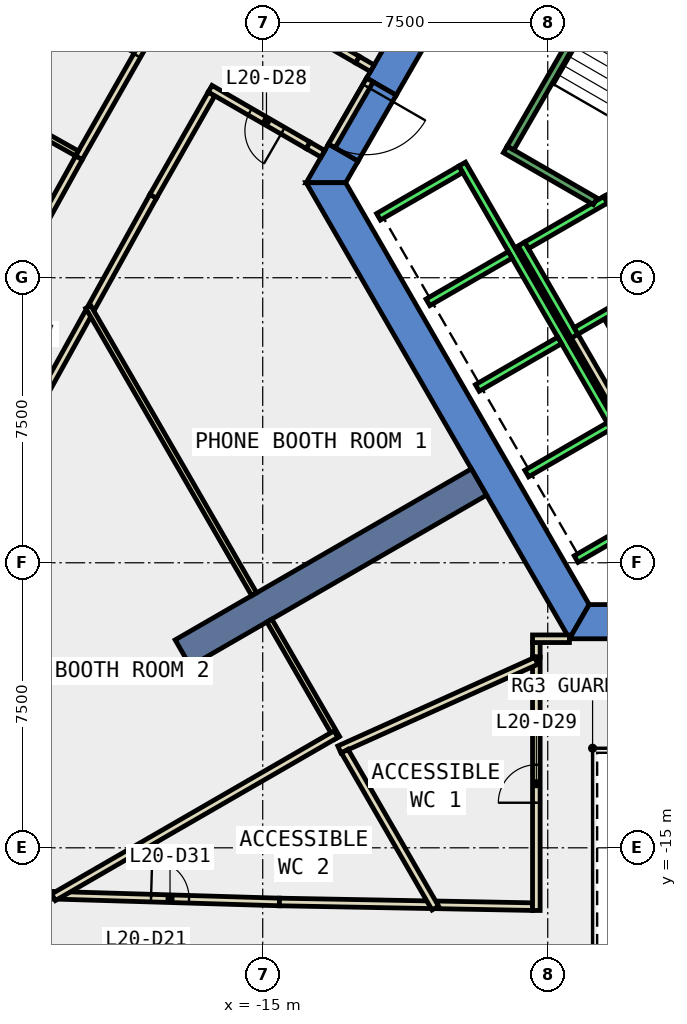
"""IFC4 building model, lengths in metres.
Left out: names, types, materials, properties, quantities, classifications, styles, units other than length and angle.
Written with IfcOpenShell. Run it as: python <this file> out.ifc"""

import sys

from ifc_helpers import new_model, si_unit, direction, frame, frame_2d, origin, place, context, subcontext, project, spatial, polyline, rectangle, outline, extrude, element, fill, save


model = new_model("IFC4")
c1 = context("Model", 3, precision=1e-05, world=origin(), true_north=direction((0.0, 1.0)))
c2 = subcontext(c1, "Body", "Model", "MODEL_VIEW")
j1 = project(units=[si_unit("LENGTHUNIT", "METRE"), si_unit("PLANEANGLEUNIT", "RADIAN")], contexts=[c1])
p1 = place(None, origin())
s1 = spatial("IfcSite", under=j1, at=p1, CompositionType="ELEMENT")
p2 = place(p1, origin())
s2 = spatial("IfcBuilding", under=s1, at=p2, CompositionType="ELEMENT")
p3 = place(p2, frame((0.0, 0.0, 95.0)))
s3 = spatial("IfcBuildingStorey", under=s2, at=p3, CompositionType="ELEMENT", Elevation=95.0)
p4 = place(p3, frame((0.0, 0.0, -0.4)))
e1 = element("IfcWall", 1, at=p4, inside=s3, PredefinedType="SHEAR", context=c2, shape_type="SweptSolid", body=[
    extrude(outline(polyline([(-12.267, 5.252), (-11.488, 4.802), (-6.409, 13.6), (-6.928, 14.5), (-12.267, 5.252)])), origin(), (0.0, 0.0, 1.0), 4.2),
])
p5 = place(p3, frame((0.0, 0.0, -0.4)))
e2 = element("IfcWall", 2, at=p5, inside=s3, PredefinedType="SHEAR", context=c2, shape_type="SweptSolid", body=[
    extrude(outline(polyline([(-12.488, 3.07), (-13.267, 3.52), (-13.856, 2.5), (-12.817, 2.5), (-12.488, 3.07)])), origin(), (0.0, 0.0, 1.0), 4.2),
])
p6 = place(p3, frame((0.0, 0.0, 3.6)))
e3 = element("IfcWall", 3, at=p6, inside=s3, PredefinedType="SHEAR", context=c2, shape_type="SweptSolid", body=[
    extrude(outline(polyline([(-13.267, 3.52), (-12.488, 3.07), (-11.488, 4.802), (-12.267, 5.252), (-13.267, 3.52)])), origin(), (0.0, 0.0, 1.0), 0.2),
])
p7 = place(p3, frame((0.0, 0.0, -0.4)))
e4 = element("IfcWall", 4, at=p7, inside=s3, PredefinedType="SHEAR", context=c2, shape_type="SweptSolid", body=[
    extrude(outline(polyline([(-13.856, 2.5), (-6.928, -9.5), (-6.409, -8.6), (-12.817, 2.5), (-13.856, 2.5)])), origin(), (0.0, 0.0, 1.0), 4.2),
])
p8 = place(p3, frame((0.0, 0.0, -0.4)))
e5 = element("IfcWall", 5, at=p8, inside=s3, PredefinedType="SHEAR", context=c2, shape_type="SweptSolid", body=[
    extrude(outline(polyline([(3.75, -9.5), (3.75, -8.6), (-6.409, -8.6), (-6.928, -9.5), (3.75, -9.5)])), origin(), (0.0, 0.0, 1.0), 4.2),
])
p9 = place(p3, frame((-9.31, -5.375, -0.4), z_axis=(0.0, 0.0, 1.0), x_axis=(-0.866017533419, -0.500013631625, 0.0)))
e6 = element("IfcWall", 6, at=p9, inside=s3, PredefinedType="SHEAR", context=c2, shape_type="SweptSolid", body=[
    extrude(rectangle(XDim=9.0, YDim=0.8, at=frame_2d((4.5, 0.0))), origin(), (0.0, 0.0, 1.0), 4.2),
])
p10 = place(p3, frame((-15.098, 7.233, 0.0), z_axis=(0.0, 0.0, 1.0), x_axis=(0.866101363304, -0.499868411168, 0.0)))
e7 = element("IfcWall", 7, at=p10, inside=s3, PredefinedType="PARTITIONING", context=c2, shape_type="SweptSolid", body=[
    extrude(rectangle(XDim=2.992, YDim=0.2, at=frame_2d((1.496, 0.0))), origin(), (0.0, 0.0, 1.0), 3.8),
])
p11 = place(p3, frame((-17.883, 2.143, 0.0), z_axis=(0.0, 0.0, 1.0), x_axis=(-0.484695523805, -0.874682942101, 0.0)))
e8 = element("IfcWall", 8, at=p11, inside=s3, PredefinedType="PARTITIONING", context=c2, shape_type="SweptSolid", body=[
    extrude(rectangle(XDim=3.349, YDim=0.2, at=frame_2d((1.674, 0.0))), origin(), (0.0, 0.0, 1.0), 3.8),
])
p12 = place(p3, frame((-13.417, 3.26, 0.0), z_axis=(0.0, 0.0, 1.0), x_axis=(-0.866032067792, 0.499988457423, 0.0)))
e9 = element("IfcWall", 9, at=p12, inside=s3, PredefinedType="PARTITIONING", context=c2, shape_type="SweptSolid", body=[
    extrude(rectangle(XDim=0.45, YDim=0.2, at=frame_2d((0.225, 0.0))), origin(), (0.0, 0.0, 1.0), 2.4),
])
p13 = place(p3, frame((-16.348, 4.837, 0.0), z_axis=(0.0, 0.0, 1.0), x_axis=(-0.495121026513, -0.868824015037, 0.0)))
e10 = element("IfcWall", 10, at=p13, inside=s3, PredefinedType="PARTITIONING", context=c2, shape_type="SweptSolid", body=[
    extrude(rectangle(XDim=3.101, YDim=0.2, at=frame_2d((1.55, 0.0))), origin(), (0.0, 0.0, 1.0), 3.8),
])
p14 = place(p3, frame((-10.408, -16.501, 0.0), z_axis=(0.0, 0.0, 1.0), x_axis=(0.999823568917, -0.018783797216, 0.0)))
e11 = element("IfcWall", 11, at=p14, inside=s3, PredefinedType="PARTITIONING", context=c2, shape_type="SweptSolid", body=[
    extrude(rectangle(XDim=2.509, YDim=0.2, at=frame_2d((1.254, 0.0))), origin(), (0.0, 0.0, 1.0), 3.8),
])
p15 = place(p3, frame((-19.579, -0.917, 0.0), z_axis=(0.0, 0.0, 1.0), x_axis=(-0.484700239797, -0.874680328772, 0.0)))
e12 = element("IfcWall", 12, at=p15, inside=s3, PredefinedType="PARTITIONING", context=c2, shape_type="SweptSolid", body=[
    extrude(rectangle(XDim=3.585, YDim=0.2, at=frame_2d((1.792, 0.0))), origin(), (0.0, 0.0, 1.0), 3.8),
])
p16 = place(p3, frame((-21.446, -16.22, 0.0), z_axis=(0.0, 0.0, 1.0), x_axis=(0.999542625536, -0.030241358047, 0.0)))
e13 = element("IfcWall", 13, at=p16, inside=s3, PredefinedType="PARTITIONING", context=c2, shape_type="SweptSolid", body=[
    extrude(rectangle(XDim=0.928, YDim=0.2, at=frame_2d((0.464, 0.0))), origin(), (0.0, 0.0, 1.0), 3.8),
])
p17 = place(p3, frame((-20.318, -16.253, 0.0), z_axis=(0.0, 0.0, 1.0), x_axis=(0.999553385537, -0.029883598524, 0.0)))
e14 = element("IfcWall", 14, at=p17, inside=s3, PredefinedType="PARTITIONING", context=c2, shape_type="SweptSolid", body=[
    extrude(rectangle(XDim=5.76, YDim=0.2, at=frame_2d((2.88, 0.0))), origin(), (0.0, 0.0, 1.0), 3.8),
])
p18 = place(p17, frame((2.38, 0.0, 0.0)))
e15 = element("IfcOpeningElement", 15, at=p18, cuts=e14, PredefinedType="OPENING", context=c2, shape_type="SweptSolid", body=[
    extrude(rectangle(XDim=1.0, YDim=2.1, at=frame_2d((0.5, 1.05))), frame((0.0, 0.11, 0.0), z_axis=(0.0, -1.0, 0.0), x_axis=(1.0, 0.0, 0.0)), (0.0, 0.0, 1.0), 0.22),
])
p19 = place(p3, frame((-14.561, -16.425, 0.0), z_axis=(0.0, 0.0, 1.0), x_axis=(0.999829548691, -0.018462761553, 0.0)))
e16 = element("IfcWall", 16, at=p19, inside=s3, PredefinedType="PARTITIONING", context=c2, shape_type="SweptSolid", body=[
    extrude(rectangle(XDim=3.954, YDim=0.2, at=frame_2d((1.977, 0.0))), origin(), (0.0, 0.0, 1.0), 3.8),
])
p20 = place(p3, frame((-19.838, 3.156, 0.0), z_axis=(0.0, 0.0, 1.0), x_axis=(0.494978648769, 0.868905137091, 0.0)))
e17 = element("IfcWall", 17, at=p20, inside=s3, PredefinedType="PARTITIONING", context=c2, shape_type="SweptSolid", body=[
    extrude(rectangle(XDim=7.186, YDim=0.2, at=frame_2d((3.593, 0.0))), origin(), (0.0, 0.0, 1.0), 3.8),
])
p21 = place(p20, frame((3.093, 0.0, 0.0)))
e18 = element("IfcOpeningElement", 18, at=p21, cuts=e17, PredefinedType="OPENING", context=c2, shape_type="SweptSolid", body=[
    extrude(rectangle(XDim=1.0, YDim=2.1, at=frame_2d((0.5, 1.05))), frame((0.0, 0.11, 0.0), z_axis=(0.0, -1.0, 0.0), x_axis=(1.0, 0.0, 0.0)), (0.0, 0.0, 1.0), 0.22),
])
p22 = place(p3, frame((-23.284, -3.064, 0.0), z_axis=(0.0, 0.0, 1.0), x_axis=(0.48478560119, 0.874633020689, 0.0)))
e19 = element("IfcWall", 19, at=p22, inside=s3, PredefinedType="PARTITIONING", context=c2, shape_type="SweptSolid", body=[
    extrude(rectangle(XDim=7.11, YDim=0.2, at=frame_2d((3.555, 0.0))), origin(), (0.0, 0.0, 1.0), 3.8),
])
p23 = place(p22, frame((3.13, 0.0, 0.0)))
e20 = element("IfcOpeningElement", 20, at=p23, cuts=e19, PredefinedType="OPENING", context=c2, shape_type="SweptSolid", body=[
    extrude(rectangle(XDim=1.0, YDim=2.1, at=frame_2d((0.5, 1.05))), frame((0.0, 0.11, 0.0), z_axis=(0.0, -1.0, 0.0), x_axis=(1.0, 0.0, 0.0)), (0.0, 0.0, 1.0), 0.22),
])
p24 = place(p3, frame((-5.126, -2.422, 0.0), z_axis=(0.0, 0.0, 1.0), x_axis=(-0.500062241894, 0.865989465428, 0.0)))
e21 = element("IfcWall", 21, at=p24, inside=s3, PredefinedType="PARTITIONING", context=c2, shape_type="SweptSolid", body=[
    extrude(rectangle(XDim=1.7, YDim=0.2, at=frame_2d((0.85, 0.0))), origin(), (0.0, 0.0, 1.0), 3.8),
])
p25 = place(p3, frame((-5.492, -3.788, 0.0), z_axis=(0.0, 0.0, 1.0), x_axis=(-0.500008949224, 0.866020236886, 0.0)))
e22 = element("IfcWall", 22, at=p25, inside=s3, PredefinedType="PARTITIONING", context=c2, shape_type="SweptSolid", body=[
    extrude(rectangle(XDim=2.68, YDim=0.2, at=frame_2d((1.34, 0.0))), origin(), (0.0, 0.0, 1.0), 3.8),
])
p26 = place(p3, frame((-7.8, -9.98, 0.0), z_axis=(0.0, 0.0, 1.0), x_axis=(0.0, 1.0, 0.0)))
e23 = element("IfcWall", 23, at=p26, inside=s3, PredefinedType="PARTITIONING", context=c2, shape_type="SweptSolid", body=[
    extrude(rectangle(XDim=0.381, YDim=0.2, at=frame_2d((0.19, 0.0))), origin(), (0.0, 0.0, 1.0), 3.8),
])
p27 = place(p3, frame((-7.9, -9.499, 0.0), z_axis=(0.0, 0.0, 1.0), x_axis=(1.0, 0.0, 0.0)))
e24 = element("IfcWall", 24, at=p27, inside=s3, PredefinedType="PARTITIONING", context=c2, shape_type="SweptSolid", body=[
    extrude(rectangle(XDim=0.971, YDim=0.2, at=frame_2d((0.485, 0.0))), origin(), (0.0, 0.0, 1.0), 3.8),
])
p28 = place(p3, frame((-7.8, -16.649, 0.0), z_axis=(0.0, 0.0, 1.0), x_axis=(0.0, 1.0, 0.0)))
e25 = element("IfcWall", 25, at=p28, inside=s3, PredefinedType="PARTITIONING", context=c2, shape_type="SweptSolid", body=[
    extrude(rectangle(XDim=6.669, YDim=0.2, at=frame_2d((3.334, 0.0))), origin(), (0.0, 0.0, 1.0), 3.8),
])
p29 = place(p28, frame((2.835, 0.0, 0.0)))
e26 = element("IfcOpeningElement", 26, at=p29, cuts=e25, PredefinedType="OPENING", context=c2, shape_type="SweptSolid", body=[
    extrude(rectangle(XDim=1.0, YDim=2.1, at=frame_2d((0.5, 1.05))), frame((0.0, 0.11, 0.0), z_axis=(0.0, -1.0, 0.0), x_axis=(1.0, 0.0, 0.0)), (0.0, 0.0, 1.0), 0.22),
])
p30 = place(p3, frame((-7.8, -10.08, 0.0), z_axis=(0.0, 0.0, 1.0), x_axis=(-0.911938383636, -0.410327167577, 0.0)))
e27 = element("IfcWall", 27, at=p30, inside=s3, PredefinedType="PARTITIONING", context=c2, shape_type="SweptSolid", body=[
    extrude(rectangle(XDim=5.683, YDim=0.2, at=frame_2d((2.842, 0.0))), origin(), (0.0, 0.0, 1.0), 3.8),
])
p31 = place(p3, frame((-13.043, -12.108, 0.0), z_axis=(0.0, 0.0, 1.0), x_axis=(-0.499947764329, 0.866055559963, 0.0)))
e28 = element("IfcWall", 28, at=p31, inside=s3, PredefinedType="PARTITIONING", context=c2, shape_type="SweptSolid", body=[
    extrude(rectangle(XDim=3.564, YDim=0.15, at=frame_2d((1.782, 0.0))), origin(), (0.0, 0.0, 1.0), 3.8),
])
p32 = place(p3, frame((-10.458, -16.586, 0.0), z_axis=(0.0, 0.0, 1.0), x_axis=(-0.500121439648, 0.865955279218, 0.0)))
e29 = element("IfcWall", 29, at=p32, inside=s3, PredefinedType="PARTITIONING", context=c2, shape_type="SweptSolid", body=[
    extrude(rectangle(XDim=4.767, YDim=0.2, at=frame_2d((2.383, 0.0))), origin(), (0.0, 0.0, 1.0), 3.8),
])
p33 = place(p3, frame((-13.072, -12.009, 0.0), z_axis=(0.0, 0.0, 1.0), x_axis=(-0.865993734772, -0.500054848326, 0.0)))
e30 = element("IfcWall", 30, at=p33, inside=s3, PredefinedType="PARTITIONING", context=c2, shape_type="SweptSolid", body=[
    extrude(rectangle(XDim=8.583, YDim=0.2, at=frame_2d((4.292, 0.0))), origin(), (0.0, 0.0, 1.0), 3.8),
])
p34 = place(p3, frame((-19.888, 3.27, 0.0), z_axis=(0.0, 0.0, 1.0), x_axis=(-0.871789386467, 0.489880868828, 0.0)))
e31 = element("IfcWall", 31, at=p34, inside=s3, PredefinedType="PARTITIONING", context=c2, shape_type="SweptSolid", body=[
    extrude(rectangle(XDim=5.73, YDim=0.15, at=frame_2d((2.865, 0.0))), origin(), (0.0, 0.0, 1.0), 3.8),
])
p35 = place(p3, frame((-12.18, 5.202, 0.0), z_axis=(0.0, 0.0, 1.0), x_axis=(-0.50002537861, -0.866010750942, 0.0)))
e32 = element("IfcWall", 32, at=p35, inside=s3, PredefinedType="PARTITIONING", context=c2, shape_type="SweptSolid", body=[
    extrude(rectangle(XDim=2.0, YDim=0.2, at=frame_2d((1.0, 0.0))), origin(), (0.0, 0.0, 1.0), 2.4),
])
p36 = place(p35, frame((0.19, 0.0, 0.0)))
e33 = element("IfcOpeningElement", 33, at=p36, cuts=e32, PredefinedType="OPENING", context=c2, shape_type="SweptSolid", body=[
    extrude(rectangle(XDim=1.8, YDim=2.1, at=frame_2d((0.9, 1.05))), frame((0.0, 0.11, 0.0), z_axis=(0.0, -1.0, 0.0), x_axis=(1.0, 0.0, 0.0)), (0.0, 0.0, 1.0), 0.22),
])
p37 = place(p3, frame((-15.225, -8.328, 0.0), z_axis=(0.0, 0.0, 1.0), x_axis=(-0.500038648455, 0.866003088939, 0.0)))
e34 = element("IfcWall", 34, at=p37, inside=s3, PredefinedType="PARTITIONING", context=c2, shape_type="SweptSolid", body=[
    extrude(rectangle(XDim=8.733, YDim=0.15, at=frame_2d((4.367, 0.0))), origin(), (0.0, 0.0, 1.0), 3.8),
])
p38 = place(p3, frame((-12.506, 5.737, 0.0), z_axis=(0.0, 0.0, 1.0), x_axis=(0.865624510465, -0.500693725627, 0.0)))
e35 = element("IfcWall", 35, at=p38, inside=s3, PredefinedType="PARTITIONING", context=c2, shape_type="SweptSolid", body=[
    extrude(rectangle(XDim=0.449, YDim=0.2, at=frame_2d((0.225, 0.0))), origin(), (0.0, 0.0, 1.0), 2.4),
])
p39 = place(p3, frame((-13.807, 3.485, 0.0), z_axis=(0.0, 0.0, 1.0), x_axis=(-0.865947944451, 0.500134139508, 0.0)))
e36 = element("IfcWall", 36, at=p39, inside=s3, PredefinedType="PARTITIONING", context=c2, shape_type="SweptSolid", body=[
    extrude(rectangle(XDim=2.977, YDim=0.2, at=frame_2d((1.489, 0.0))), origin(), (0.0, 0.0, 1.0), 3.8),
])
p40 = place(p39, frame((0.764, 0.0, 0.0)))
e37 = element("IfcOpeningElement", 37, at=p40, cuts=e36, PredefinedType="OPENING", context=c2, shape_type="SweptSolid", body=[
    extrude(rectangle(XDim=1.0, YDim=2.1, at=frame_2d((0.5, 1.05))), frame((0.0, 0.11, 0.0), z_axis=(0.0, -1.0, 0.0), x_axis=(1.0, 0.0, 0.0)), (0.0, 0.0, 1.0), 0.22),
])
p41 = place(p3, frame((-5.94, 2.188, 0.0), z_axis=(0.0, 0.0, 1.0), x_axis=(0.49994636267, -0.866056369097, 0.0)))
e38 = element("IfcWall", 38, at=p41, inside=s3, PredefinedType="STANDARD", context=c2, shape_type="SweptSolid", body=[
    extrude(rectangle(XDim=2.8, YDim=0.2, at=frame_2d((1.4, 0.0))), origin(), (0.0, 0.0, 1.0), 3.8),
])
p42 = place(p41, frame((1.225, 0.0, 0.0)))
e39 = element("IfcOpeningElement", 39, at=p42, cuts=e38, PredefinedType="OPENING", context=c2, shape_type="SweptSolid", body=[
    extrude(rectangle(XDim=1.1, YDim=2.1, at=frame_2d((0.55, 1.05))), frame((0.0, 0.11, 0.0), z_axis=(0.0, -1.0, 0.0), x_axis=(1.0, 0.0, 0.0)), (0.0, 0.0, 1.0), 0.22),
])
p43 = place(p3, frame((-8.192, 0.888, 0.0), z_axis=(0.0, 0.0, 1.0), x_axis=(0.49994636267, -0.866056369097, 0.0)))
e40 = element("IfcWall", 40, at=p43, inside=s3, PredefinedType="STANDARD", context=c2, shape_type="SweptSolid", body=[
    extrude(rectangle(XDim=2.8, YDim=0.2, at=frame_2d((1.4, 0.0))), origin(), (0.0, 0.0, 1.0), 3.8),
])
for number, where, z_axis, x_axis in (
    (41, (-5.977, 2.052, 0.0), (0.0, 0.0, 1.0), (-0.866, -0.5, 0.0)),
    (42, (-4.677, -0.2, 0.0), (0.0, 0.0, 1.0), (-0.866, -0.5, 0.0)),
):
    element("IfcWall", number, at=place(p3, frame(where, z_axis=z_axis, x_axis=x_axis)), inside=s3, PredefinedType="STANDARD", context=c2, shape_type="SweptSolid", body=[
        extrude(rectangle(XDim=2.399, YDim=0.2, at=frame_2d((1.2, 0.0))), origin(), (0.0, 0.0, 1.0), 3.8),
    ])
p44 = place(p3, frame((-9.751, 2.99, 0.0), z_axis=(0.0, 0.0, 1.0), x_axis=(0.50000090737, -0.866024879913, 0.0)))
e43 = element("IfcWall", 43, at=p44, inside=s3, PredefinedType="STANDARD", context=c2, shape_type="SweptSolid", body=[
    extrude(rectangle(XDim=10.6, YDim=0.2, at=frame_2d((5.3, 0.0))), origin(), (0.0, 0.0, 1.0), 3.8),
])
p45 = place(p3, frame((-9.788, 2.853, 0.0), z_axis=(0.0, 0.0, 1.0), x_axis=(-0.865998541277, -0.500046524342, 0.0)))
e44 = element("IfcWall", 44, at=p45, inside=s3, PredefinedType="STANDARD", context=c2, shape_type="SweptSolid", body=[
    extrude(rectangle(XDim=2.5, YDim=0.2, at=frame_2d((1.25, 0.0))), origin(), (0.0, 0.0, 1.0), 3.8),
])
for number, where, z_axis, x_axis in (
    (45, (-8.488, 0.602, 0.0), (0.0, 0.0, 1.0), (-0.866, -0.5, 0.0)),
    (46, (-7.188, -1.65, 0.0), (0.0, 0.0, 1.0), (-0.866, -0.5, 0.0)),
    (47, (-5.888, -3.902, 0.0), (0.0, 0.0, 1.0), (-0.866, -0.5, 0.0)),
    (48, (-4.588, -6.153, 0.0), (0.0, 0.0, 1.0), (-0.866, -0.5, 0.0)),
):
    element("IfcWall", number, at=place(p3, frame(where, z_axis=z_axis, x_axis=x_axis)), inside=s3, PredefinedType="STANDARD", context=c2, shape_type="SweptSolid", body=[
        extrude(rectangle(XDim=2.5, YDim=0.2, at=frame_2d((1.25, 0.0))), origin(), (0.0, 0.0, 1.0), 3.8),
    ])
p46 = place(p3, frame((-6.25, 2.01, 0.0), z_axis=(0.0, 0.0, 1.0), x_axis=(-0.86611865017, 0.499838457731, 0.0)))
e49 = element("IfcWall", 49, at=p46, inside=s3, PredefinedType="STANDARD", context=c2, shape_type="SweptSolid", body=[
    extrude(rectangle(XDim=2.733, YDim=0.2, at=frame_2d((1.366, 0.0))), origin(), (0.0, 0.0, 1.0), 3.8),
])
p47 = place(p3, frame((-5.03, 9.388, 0.0), z_axis=(0.0, 0.0, 1.0), x_axis=(-0.499978703459, -0.866037698999, 0.0)))
e50 = element("IfcWall", 50, at=p47, inside=s3, PredefinedType="STANDARD", context=c2, shape_type="SweptSolid", body=[
    extrude(rectangle(XDim=6.9, YDim=0.2, at=frame_2d((3.45, 0.0))), origin(), (0.0, 0.0, 1.0), 3.8),
])
p48 = place(p21, origin())
e51 = element("IfcDoor", 51, at=p48, inside=s3, OperationType="SINGLE_SWING_LEFT", PredefinedType="DOOR", context=c2, shape_type="SweptSolid", body=[
    extrude(rectangle(XDim=1.0, YDim=2.1, at=frame_2d((0.5, 1.05))), frame((0.0, 0.025, 0.0), z_axis=(0.0, -1.0, 0.0), x_axis=(1.0, 0.0, 0.0)), (0.0, 0.0, 1.0), 0.05),
])
fill(e18, e51)
p49 = place(p40, origin())
e52 = element("IfcDoor", 52, at=p49, inside=s3, OperationType="SINGLE_SWING_LEFT", PredefinedType="DOOR", context=c2, shape_type="SweptSolid", body=[
    extrude(rectangle(XDim=1.0, YDim=2.1, at=frame_2d((0.5, 1.05))), frame((0.0, 0.025, 0.0), z_axis=(0.0, -1.0, 0.0), x_axis=(1.0, 0.0, 0.0)), (0.0, 0.0, 1.0), 0.05),
])
fill(e37, e52)
p50 = place(p29, origin())
e53 = element("IfcDoor", 53, at=p50, inside=s3, OperationType="SINGLE_SWING_LEFT", PredefinedType="DOOR", context=c2, shape_type="SweptSolid", body=[
    extrude(rectangle(XDim=1.0, YDim=2.1, at=frame_2d((0.5, 1.05))), frame((0.0, 0.025, 0.0), z_axis=(0.0, -1.0, 0.0), x_axis=(1.0, 0.0, 0.0)), (0.0, 0.0, 1.0), 0.05),
])
fill(e26, e53)
p51 = place(p18, origin())
e54 = element("IfcDoor", 54, at=p51, inside=s3, OperationType="SINGLE_SWING_LEFT", PredefinedType="DOOR", context=c2, shape_type="SweptSolid", body=[
    extrude(rectangle(XDim=1.0, YDim=2.1, at=frame_2d((0.5, 1.05))), frame((0.0, 0.025, 0.0), z_axis=(0.0, -1.0, 0.0), x_axis=(1.0, 0.0, 0.0)), (0.0, 0.0, 1.0), 0.05),
])
fill(e15, e54)
p52 = place(p36, origin())
e55 = element("IfcDoor", 55, at=p52, inside=s3, OperationType="DOUBLE_DOOR_SINGLE_SWING", PredefinedType="DOOR", context=c2, shape_type="SweptSolid", body=[
    extrude(rectangle(XDim=1.8, YDim=2.1, at=frame_2d((0.9, 1.05))), frame((0.0, 0.025, 0.0), z_axis=(0.0, -1.0, 0.0), x_axis=(1.0, 0.0, 0.0)), (0.0, 0.0, 1.0), 0.05),
])
fill(e33, e55)
save(model, sys.argv[1])
